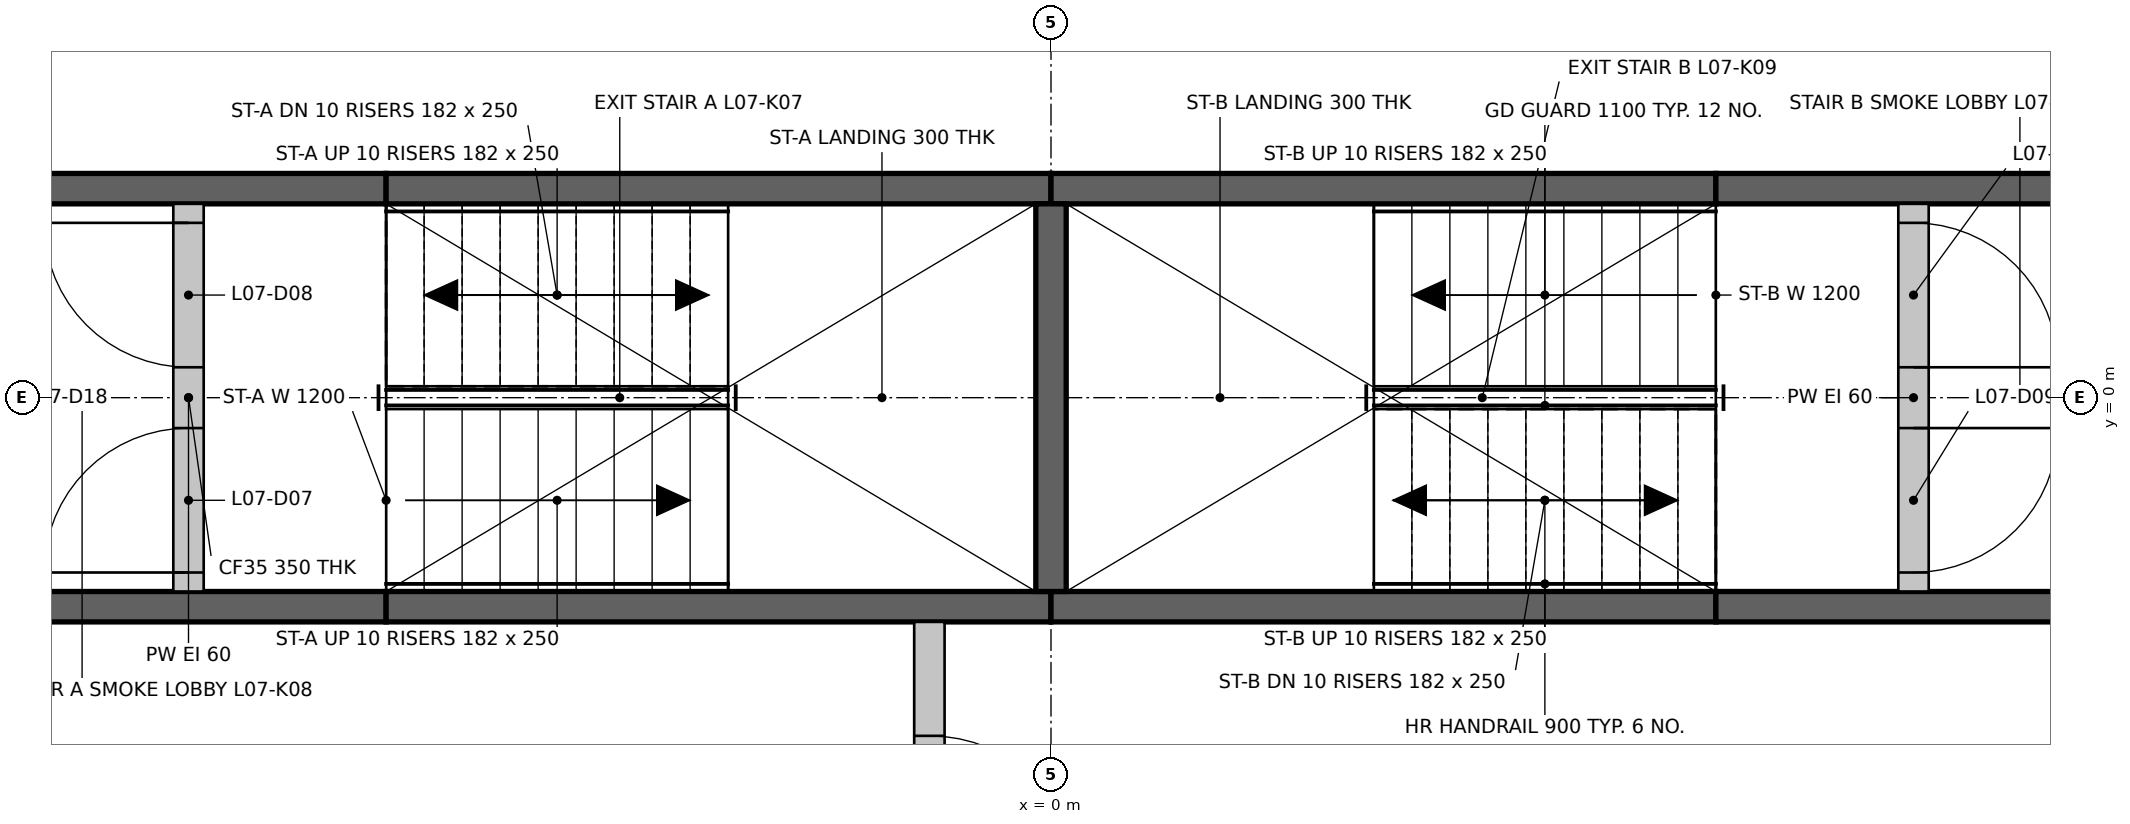
"""IFC4 building model, lengths in metres.
Left out: names, types, materials, properties, quantities, classifications, styles, units other than length and angle.
Written with IfcOpenShell. Run it as: python <this file> out.ifc"""

import sys

from ifc_helpers import new_model, si_unit, direction, frame, frame_2d, origin, place, context, subcontext, project, spatial, rectangle, extrude, element, fill, save


model = new_model("IFC4")
c1 = context("Model", 3, precision=1e-05, world=origin(), true_north=direction((0.0, 1.0)))
c2 = subcontext(c1, "Body", "Model", "MODEL_VIEW")
j1 = project(units=[si_unit("LENGTHUNIT", "METRE"), si_unit("PLANEANGLEUNIT", "RADIAN")], contexts=[c1])
p1 = place(None, origin())
s1 = spatial("IfcSite", under=j1, at=p1, CompositionType="ELEMENT")
p2 = place(p1, origin())
s2 = spatial("IfcBuilding", under=s1, at=p2, CompositionType="ELEMENT")
p3 = place(p2, frame((0.0, 0.0, 33.5)))
s3 = spatial("IfcBuildingStorey", under=s2, at=p3, CompositionType="ELEMENT", Elevation=33.5)
p4 = place(p3, frame((-6.974, -1.375, 0.0), z_axis=(0.0, 0.0, 1.0), x_axis=(1.0, 0.0, 0.0)))
e1 = element("IfcWall", 1, at=p4, inside=s3, PredefinedType="SHEAR", context=c2, shape_type="SweptSolid", body=[
    extrude(rectangle(XDim=2.6, YDim=0.2, at=frame_2d((1.3, 0.0))), origin(), (0.0, 0.0, 1.0), 3.3),
])
for number, where, z_axis, x_axis in (
    (2, (-4.374, -1.375, 0.0), (0.0, 0.0, 1.0), (1.0, 0.0, 0.0)),
    (3, (0.0, -1.375, 0.0), (0.0, 0.0, 1.0), (1.0, 0.0, 0.0)),
):
    element("IfcWall", number, at=place(p3, frame(where, z_axis=z_axis, x_axis=x_axis)), inside=s3, PredefinedType="SHEAR", context=c2, shape_type="SweptSolid", body=[
        extrude(rectangle(XDim=4.374, YDim=0.2, at=frame_2d((2.187, 0.0))), origin(), (0.0, 0.0, 1.0), 3.3),
    ])
for number, where, z_axis, x_axis in (
    (4, (4.374, -1.375, 0.0), (0.0, 0.0, 1.0), (1.0, 0.0, 0.0)),
    (5, (-6.974, 1.375, 0.0), (0.0, 0.0, 1.0), (1.0, 0.0, 0.0)),
):
    element("IfcWall", number, at=place(p3, frame(where, z_axis=z_axis, x_axis=x_axis)), inside=s3, PredefinedType="SHEAR", context=c2, shape_type="SweptSolid", body=[
        extrude(rectangle(XDim=2.6, YDim=0.2, at=frame_2d((1.3, 0.0))), origin(), (0.0, 0.0, 1.0), 3.3),
    ])
for number, where, z_axis, x_axis in (
    (6, (-4.374, 1.375, 0.0), (0.0, 0.0, 1.0), (1.0, 0.0, 0.0)),
    (7, (0.0, 1.375, 0.0), (0.0, 0.0, 1.0), (1.0, 0.0, 0.0)),
):
    element("IfcWall", number, at=place(p3, frame(where, z_axis=z_axis, x_axis=x_axis)), inside=s3, PredefinedType="SHEAR", context=c2, shape_type="SweptSolid", body=[
        extrude(rectangle(XDim=4.374, YDim=0.2, at=frame_2d((2.187, 0.0))), origin(), (0.0, 0.0, 1.0), 3.3),
    ])
p5 = place(p3, frame((4.374, 1.375, 0.0), z_axis=(0.0, 0.0, 1.0), x_axis=(1.0, 0.0, 0.0)))
e8 = element("IfcWall", 8, at=p5, inside=s3, PredefinedType="SHEAR", context=c2, shape_type="SweptSolid", body=[
    extrude(rectangle(XDim=2.6, YDim=0.2, at=frame_2d((1.3, 0.0))), origin(), (0.0, 0.0, 1.0), 3.3),
])
p6 = place(p3, frame((0.0, -1.275, 0.0), z_axis=(0.0, 0.0, 1.0), x_axis=(0.0, 1.0, 0.0)))
e9 = element("IfcWall", 9, at=p6, inside=s3, PredefinedType="SHEAR", context=c2, shape_type="SweptSolid", body=[
    extrude(rectangle(XDim=2.55, YDim=0.2, at=frame_2d((1.275, 0.0))), origin(), (0.0, 0.0, 1.0), 3.3),
])
p7 = place(p3, frame((-0.8, -3.974, 0.0), z_axis=(0.0, 0.0, 1.0), x_axis=(0.0, 1.0, 0.0)))
e10 = element("IfcWall", 10, at=p7, inside=s3, PredefinedType="PARTITIONING", context=c2, shape_type="SweptSolid", body=[
    extrude(rectangle(XDim=2.499, YDim=0.2, at=frame_2d((1.25, 0.0))), origin(), (0.0, 0.0, 1.0), 3.3),
])
p8 = place(p7, frame((0.75, 0.0, 0.0)))
e11 = element("IfcOpeningElement", 11, at=p8, cuts=e10, PredefinedType="OPENING", context=c2, shape_type="SweptSolid", body=[
    extrude(rectangle(XDim=1.0, YDim=2.1, at=frame_2d((0.5, 1.05))), frame((0.0, 0.11, 0.0), z_axis=(0.0, -1.0, 0.0), x_axis=(1.0, 0.0, 0.0)), (0.0, 0.0, 1.0), 0.22),
])
p9 = place(p3, frame((-5.674, -1.275, 0.0), z_axis=(0.0, 0.0, 1.0), x_axis=(0.0, 1.0, 0.0)))
e12 = element("IfcWall", 12, at=p9, inside=s3, PredefinedType="PARTITIONING", context=c2, shape_type="SweptSolid", body=[
    extrude(rectangle(XDim=2.55, YDim=0.2, at=frame_2d((1.275, 0.0))), origin(), (0.0, 0.0, 1.0), 3.3),
])
p10 = place(p9, frame((0.125, 0.0, 0.0)))
e13 = element("IfcOpeningElement", 13, at=p10, cuts=e12, PredefinedType="OPENING", context=c2, shape_type="SweptSolid", body=[
    extrude(rectangle(XDim=0.95, YDim=2.1, at=frame_2d((0.475, 1.05))), frame((0.0, 0.11, 0.0), z_axis=(0.0, -1.0, 0.0), x_axis=(1.0, 0.0, 0.0)), (0.0, 0.0, 1.0), 0.22),
])
p11 = place(p9, frame((1.475, 0.0, 0.0)))
e14 = element("IfcOpeningElement", 14, at=p11, cuts=e12, PredefinedType="OPENING", context=c2, shape_type="SweptSolid", body=[
    extrude(rectangle(XDim=0.95, YDim=2.1, at=frame_2d((0.475, 1.05))), frame((0.0, 0.11, 0.0), z_axis=(0.0, -1.0, 0.0), x_axis=(1.0, 0.0, 0.0)), (0.0, 0.0, 1.0), 0.22),
])
p12 = place(p3, frame((5.674, -1.275, 0.0), z_axis=(0.0, 0.0, 1.0), x_axis=(0.0, 1.0, 0.0)))
e15 = element("IfcWall", 15, at=p12, inside=s3, PredefinedType="PARTITIONING", context=c2, shape_type="SweptSolid", body=[
    extrude(rectangle(XDim=2.55, YDim=0.2, at=frame_2d((1.275, 0.0))), origin(), (0.0, 0.0, 1.0), 3.3),
])
p13 = place(p12, frame((0.125, 0.0, 0.0)))
e16 = element("IfcOpeningElement", 16, at=p13, cuts=e15, PredefinedType="OPENING", context=c2, shape_type="SweptSolid", body=[
    extrude(rectangle(XDim=0.95, YDim=2.1, at=frame_2d((0.475, 1.05))), frame((0.0, 0.11, 0.0), z_axis=(0.0, -1.0, 0.0), x_axis=(1.0, 0.0, 0.0)), (0.0, 0.0, 1.0), 0.22),
])
p14 = place(p12, frame((1.475, 0.0, 0.0)))
e17 = element("IfcOpeningElement", 17, at=p14, cuts=e15, PredefinedType="OPENING", context=c2, shape_type="SweptSolid", body=[
    extrude(rectangle(XDim=0.95, YDim=2.1, at=frame_2d((0.475, 1.05))), frame((0.0, 0.11, 0.0), z_axis=(0.0, -1.0, 0.0), x_axis=(1.0, 0.0, 0.0)), (0.0, 0.0, 1.0), 0.22),
])
p15 = place(p10, origin())
e18 = element("IfcDoor", 18, at=p15, inside=s3, OperationType="SINGLE_SWING_LEFT", PredefinedType="DOOR", context=c2, shape_type="SweptSolid", body=[
    extrude(rectangle(XDim=0.95, YDim=2.1, at=frame_2d((0.475, 1.05))), frame((0.0, 0.025, 0.0), z_axis=(0.0, -1.0, 0.0), x_axis=(1.0, 0.0, 0.0)), (0.0, 0.0, 1.0), 0.05),
])
fill(e13, e18)
p16 = place(p11, origin())
e19 = element("IfcDoor", 19, at=p16, inside=s3, OperationType="SINGLE_SWING_RIGHT", PredefinedType="DOOR", context=c2, shape_type="SweptSolid", body=[
    extrude(rectangle(XDim=0.95, YDim=2.1, at=frame_2d((0.475, 1.05))), frame((0.0, 0.025, 0.0), z_axis=(0.0, -1.0, 0.0), x_axis=(1.0, 0.0, 0.0)), (0.0, 0.0, 1.0), 0.05),
])
fill(e14, e19)
p17 = place(p13, frame((0.95, 0.0, 0.0), z_axis=(0.0, 0.0, 1.0), x_axis=(-1.0, 0.0, 0.0)))
e20 = element("IfcDoor", 20, at=p17, inside=s3, OperationType="SINGLE_SWING_RIGHT", PredefinedType="DOOR", context=c2, shape_type="SweptSolid", body=[
    extrude(rectangle(XDim=0.95, YDim=2.1, at=frame_2d((0.475, 1.05))), frame((0.0, 0.025, 0.0), z_axis=(0.0, -1.0, 0.0), x_axis=(1.0, 0.0, 0.0)), (0.0, 0.0, 1.0), 0.05),
])
fill(e16, e20)
p18 = place(p14, frame((0.95, 0.0, 0.0), z_axis=(0.0, 0.0, 1.0), x_axis=(-1.0, 0.0, 0.0)))
e21 = element("IfcDoor", 21, at=p18, inside=s3, OperationType="SINGLE_SWING_LEFT", PredefinedType="DOOR", context=c2, shape_type="SweptSolid", body=[
    extrude(rectangle(XDim=0.95, YDim=2.1, at=frame_2d((0.475, 1.05))), frame((0.0, 0.025, 0.0), z_axis=(0.0, -1.0, 0.0), x_axis=(1.0, 0.0, 0.0)), (0.0, 0.0, 1.0), 0.05),
])
fill(e17, e21)
p19 = place(p8, frame((1.0, 0.0, 0.0), z_axis=(0.0, 0.0, 1.0), x_axis=(-1.0, 0.0, 0.0)))
e22 = element("IfcDoor", 22, at=p19, inside=s3, OperationType="SINGLE_SWING_LEFT", PredefinedType="DOOR", context=c2, shape_type="SweptSolid", body=[
    extrude(rectangle(XDim=1.0, YDim=2.1, at=frame_2d((0.5, 1.05))), frame((0.0, 0.025, 0.0), z_axis=(0.0, -1.0, 0.0), x_axis=(1.0, 0.0, 0.0)), (0.0, 0.0, 1.0), 0.05),
])
fill(e11, e22)
save(model, sys.argv[1])
